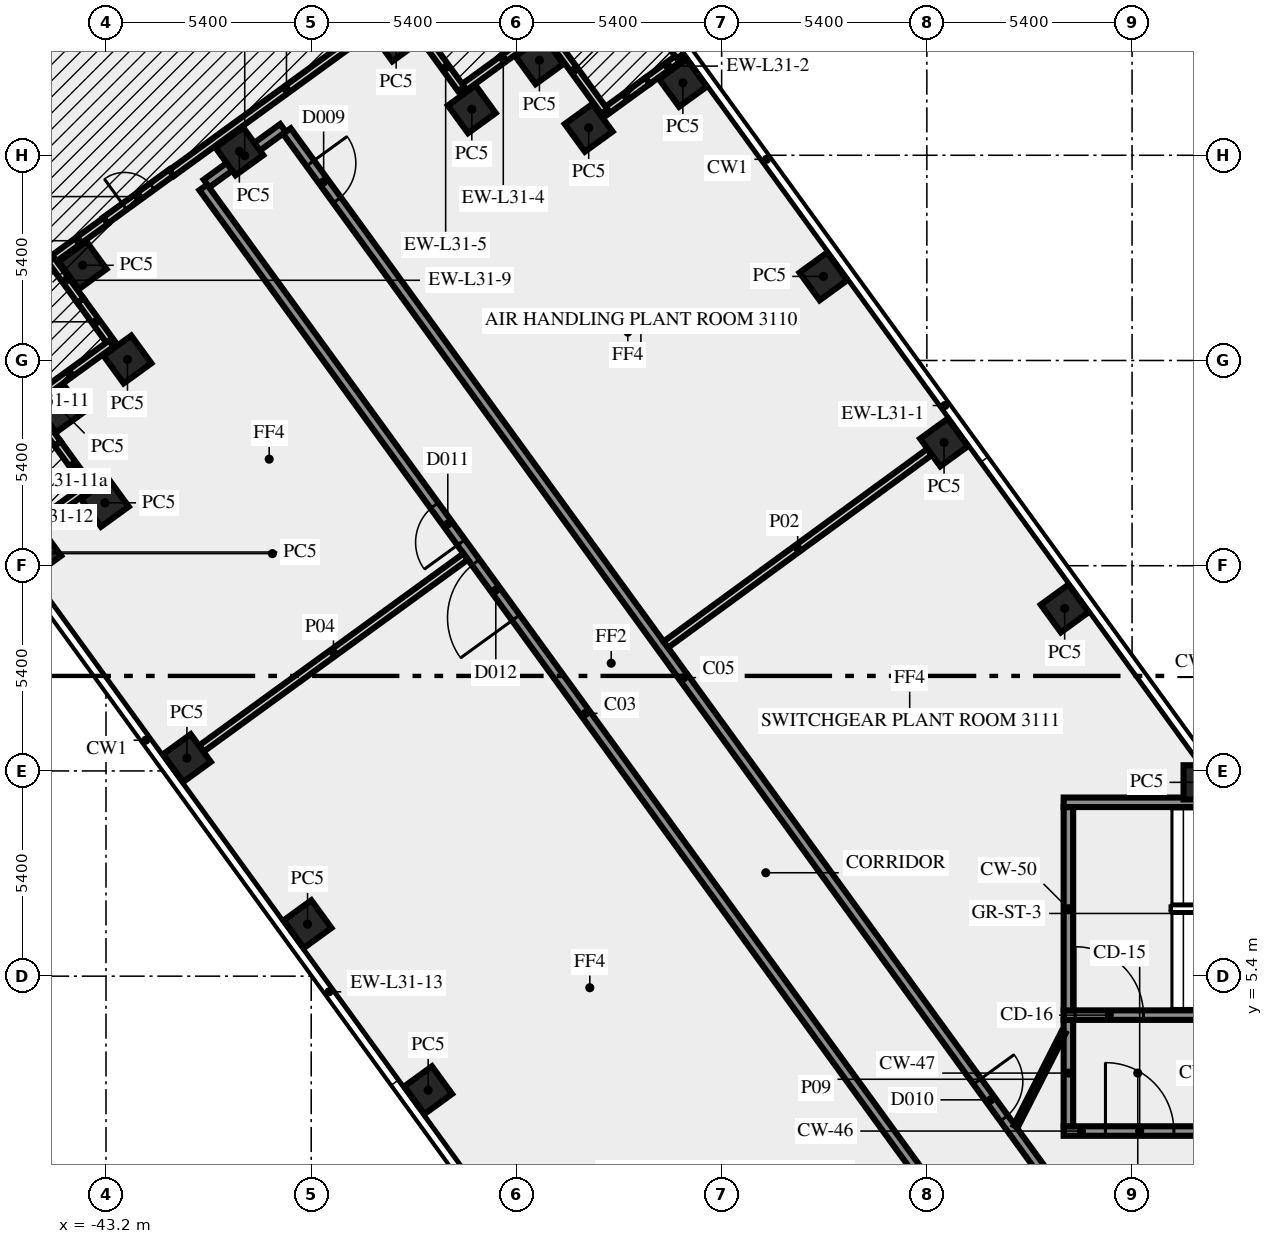
"""IFC4 building model, lengths in metres.
Left out: names, types, materials, properties, quantities, classifications, styles, units other than length and angle.
Written with IfcOpenShell. Run it as: python <this file> out.ifc"""

import sys

from ifc_helpers import new_model, si_unit, direction, frame, frame_2d, origin, origin_2d, place, context, subcontext, project, spatial, rectangle, extrude, element, fill, save


model = new_model("IFC4")
c1 = context("Model", 3, precision=1e-05, world=origin(), true_north=direction((0.0, 1.0)))
c2 = subcontext(c1, "Body", "Model", "MODEL_VIEW")
j1 = project(units=[si_unit("LENGTHUNIT", "METRE"), si_unit("PLANEANGLEUNIT", "RADIAN")], contexts=[c1])
p1 = place(None, origin())
s1 = spatial("IfcSite", under=j1, at=p1, CompositionType="ELEMENT")
p2 = place(p1, origin())
s2 = spatial("IfcBuilding", under=s1, at=p2, CompositionType="ELEMENT")
p3 = place(p2, frame((0.0, 0.0, 133.0)))
s3 = spatial("IfcBuildingStorey", under=s2, at=p3, CompositionType="ELEMENT", Elevation=133.0)
for number, where, z_axis, x_axis in (
    (1, (-17.974, 15.075, 0.0), (0.0, 0.0, 1.0), (-0.588, 0.809, 0.0)),
    (2, (-21.147, 19.444, 0.0), (0.0, 0.0, 1.0), (-0.588, 0.809, 0.0)),
    (3, (-24.321, 23.812, 0.0), (0.0, 0.0, 1.0), (-0.588, 0.809, 0.0)),
    (4, (-28.02, 28.905, 0.0), (0.0, 0.0, 1.0), (-0.809, -0.588, 0.0)),
    (5, (-30.499, 27.723, 0.0), (0.0, 0.0, 1.0), (-0.809, -0.588, 0.0)),
    (6, (-31.795, 29.5, 0.0), (0.0, 0.0, 1.0), (-0.588, 0.809, 0.0)),
    (7, (-33.574, 28.209, 0.0), (0.0, 0.0, 1.0), (-0.588, 0.809, 0.0)),
    (8, (-35.565, 30.1, 0.0), (0.0, 0.0, 1.0), (-0.809, -0.588, 0.0)),
    (9, (-39.691, 27.102, 0.0), (0.0, 0.0, 1.0), (-0.809, -0.588, 0.0)),
    (10, (-43.815, 24.105, 0.0), (0.0, 0.0, 1.0), (-0.809, -0.588, 0.0)),
    (11, (-42.635, 21.626, 0.0), (0.0, 0.0, 1.0), (-0.809, -0.588, 0.0)),
    (12, (-44.415, 20.335, 0.0), (0.0, 0.0, 1.0), (0.588, -0.809, 0.0)),
    (13, (-43.231, 17.854, 0.0), (0.0, 0.0, 1.0), (0.588, -0.809, 0.0)),
    (14, (-45.01, 16.56, 0.0), (0.0, 0.0, 1.0), (0.588, -0.809, 0.0)),
    (15, (-41.07, 11.137, 0.0), (0.0, 0.0, 1.0), (0.588, -0.809, 0.0)),
    (16, (-37.896, 6.769, 0.0), (0.0, 0.0, 1.0), (0.588, -0.809, 0.0)),
    (17, (-34.722, 2.4, 0.0), (0.0, 0.0, 1.0), (0.588, -0.809, 0.0)),
    (18, (-14.395, 10.5, 0.0), (0.0, 0.0, 1.0), (-1.0, 0.0, 0.0)),
):
    element("IfcColumn", number, at=place(p3, frame(where, z_axis=z_axis, x_axis=x_axis)), inside=s3, PredefinedType="COLUMN", context=c2, shape_type="SweptSolid", body=[
        extrude(rectangle(XDim=0.9, YDim=0.9, at=origin_2d()), origin(), (0.0, 0.0, 1.0), 5.6),
    ])
p4 = place(p3, frame((-14.354, 11.093, 0.0), z_axis=(0.0, 0.0, 1.0), x_axis=(-0.587790518608, 0.809013168147, 0.0)))
e19 = element("IfcWall", 19, at=p4, inside=s3, PredefinedType="SOLIDWALL", context=c2, shape_type="SweptSolid", body=[
    extrude(rectangle(XDim=23.044, YDim=0.2, at=frame_2d((11.522, 0.0))), origin(), (0.0, 0.0, 1.0), 5.6),
])
p5 = place(p3, frame((-27.882, 29.733, 0.0), z_axis=(0.0, 0.0, 1.0), x_axis=(-0.809064357795, -0.587720056613, 0.0)))
e20 = element("IfcWall", 20, at=p5, inside=s3, PredefinedType="SOLIDWALL", context=c2, shape_type="SweptSolid", body=[
    extrude(rectangle(XDim=1.318, YDim=0.2, at=frame_2d((0.659, 0.0))), origin(), (0.0, 0.0, 1.0), 5.6),
])
p6 = place(p3, frame((-28.949, 28.959, 0.0), z_axis=(0.0, 0.0, 1.0), x_axis=(-0.809003403559, -0.587803957991, 0.0)))
e21 = element("IfcWall", 21, at=p6, inside=s3, PredefinedType="SOLIDWALL", context=c2, shape_type="SweptSolid", body=[
    extrude(rectangle(XDim=1.382, YDim=0.2, at=frame_2d((0.691, 0.0))), origin(), (0.0, 0.0, 1.0), 4.1),
])
for number, where, z_axis, x_axis in (
    (22, (-30.083, 28.149, 0.0), (0.0, 0.0, 1.0), (-0.588, 0.809, 0.0)),
    (23, (-31.654, 30.331, 0.0), (0.0, 0.0, 1.0), (-0.809, -0.588, 0.0)),
):
    element("IfcWall", number, at=place(p3, frame(where, z_axis=z_axis, x_axis=x_axis)), inside=s3, PredefinedType="SOLIDWALL", context=c2, shape_type="SweptSolid", body=[
        extrude(rectangle(XDim=2.7, YDim=0.2, at=frame_2d((1.35, 0.0))), origin(), (0.0, 0.0, 1.0), 5.6),
    ])
p7 = place(p3, frame((-33.855, 28.746, 0.0), z_axis=(0.0, 0.0, 1.0), x_axis=(-0.587847138415, 0.808972027858, 0.0)))
e24 = element("IfcWall", 24, at=p7, inside=s3, PredefinedType="SOLIDWALL", context=c2, shape_type="SweptSolid", body=[
    extrude(rectangle(XDim=1.387, YDim=0.2, at=frame_2d((0.693, 0.0))), origin(), (0.0, 0.0, 1.0), 4.1),
])
p8 = place(p3, frame((-35.425, 30.928, 0.0), z_axis=(0.0, 0.0, 1.0), x_axis=(-0.809001309088, -0.587806840633, 0.0)))
e25 = element("IfcWall", 25, at=p8, inside=s3, PredefinedType="SOLIDWALL", context=c2, shape_type="SweptSolid", body=[
    extrude(rectangle(XDim=7.481, YDim=0.2, at=frame_2d((3.741, 0.0))), origin(), (0.0, 0.0, 1.0), 5.6),
])
p9 = place(p3, frame((-43.214, 25.284, 0.0), z_axis=(0.0, 0.0, 1.0), x_axis=(0.809022465264, 0.587777722186, 0.0)))
e26 = element("IfcWall", 26, at=p9, inside=s3, PredefinedType="SOLIDWALL", context=c2, shape_type="SweptSolid", body=[
    extrude(rectangle(XDim=2.137, YDim=0.2, at=frame_2d((1.069, 0.0))), origin(), (0.0, 0.0, 1.0), 5.6),
])
p10 = place(p9, frame((0.619, 0.0, 0.0)))
e27 = element("IfcOpeningElement", 27, at=p10, cuts=e26, PredefinedType="OPENING", context=c2, shape_type="SweptSolid", body=[
    extrude(rectangle(XDim=0.9, YDim=2.1, at=frame_2d((0.45, 1.05))), frame((0.0, 0.11, 0.0), z_axis=(0.0, -1.0, 0.0), x_axis=(1.0, 0.0, 0.0)), (0.0, 0.0, 1.0), 0.22),
])
p11 = place(p3, frame((-43.207, 25.274, 0.0), z_axis=(0.0, 0.0, 1.0), x_axis=(-0.808955331464, -0.587870114648, 0.0)))
e28 = element("IfcWall", 28, at=p11, inside=s3, PredefinedType="SOLIDWALL", context=c2, shape_type="SweptSolid", body=[
    extrude(rectangle(XDim=1.781, YDim=0.2, at=frame_2d((0.891, 0.0))), origin(), (0.0, 0.0, 1.0), 5.6),
])
p12 = place(p3, frame((-44.645, 24.244, 0.0), z_axis=(0.0, 0.0, 1.0), x_axis=(0.587797718958, -0.809007936665, 0.0)))
e29 = element("IfcWall", 29, at=p12, inside=s3, PredefinedType="SOLIDWALL", context=c2, shape_type="SweptSolid", body=[
    extrude(rectangle(XDim=1.32, YDim=0.2, at=frame_2d((0.66, 0.0))), origin(), (0.0, 0.0, 1.0), 5.6),
])
p13 = place(p3, frame((-43.869, 23.176, 0.0), z_axis=(0.0, 0.0, 1.0), x_axis=(0.587845576324, -0.808973162964, 0.0)))
e30 = element("IfcWall", 30, at=p13, inside=s3, PredefinedType="SOLIDWALL", context=c2, shape_type="SweptSolid", body=[
    extrude(rectangle(XDim=1.38, YDim=0.2, at=frame_2d((0.69, 0.0))), origin(), (0.0, 0.0, 1.0), 4.1),
])
p14 = place(p3, frame((-43.061, 22.043, 0.0), z_axis=(0.0, 0.0, 1.0), x_axis=(-0.809033161865, -0.587762999008, 0.0)))
e31 = element("IfcWall", 31, at=p14, inside=s3, PredefinedType="SOLIDWALL", context=c2, shape_type="SweptSolid", body=[
    extrude(rectangle(XDim=2.7, YDim=0.2, at=frame_2d((1.35, 0.0))), origin(), (0.0, 0.0, 1.0), 5.6),
])
p15 = place(p3, frame((-45.242, 20.473, 0.0), z_axis=(0.0, 0.0, 1.0), x_axis=(0.587652369972, -0.809113522361, 0.0)))
e32 = element("IfcWall", 32, at=p15, inside=s3, PredefinedType="SOLIDWALL", context=c2, shape_type="SweptSolid", body=[
    extrude(rectangle(XDim=1.314, YDim=0.2, at=frame_2d((0.657, 0.0))), origin(), (0.0, 0.0, 1.0), 5.6),
])
p16 = place(p3, frame((-44.47, 19.41, 0.0), z_axis=(0.0, 0.0, 1.0), x_axis=(0.58786788786, -0.808956949672, 0.0)))
e33 = element("IfcWall", 33, at=p16, inside=s3, PredefinedType="SOLIDWALL", context=c2, shape_type="SweptSolid", body=[
    extrude(rectangle(XDim=1.386, YDim=0.2, at=frame_2d((0.693, 0.0))), origin(), (0.0, 0.0, 1.0), 4.1),
])
p17 = place(p3, frame((-43.658, 18.272, 0.0), z_axis=(0.0, 0.0, 1.0), x_axis=(-0.808958916286, -0.58786518162, 0.0)))
e34 = element("IfcWall", 34, at=p17, inside=s3, PredefinedType="SOLIDWALL", context=c2, shape_type="SweptSolid", body=[
    extrude(rectangle(XDim=2.7, YDim=0.2, at=frame_2d((1.35, 0.0))), origin(), (0.0, 0.0, 1.0), 5.6),
])
p18 = place(p3, frame((-45.84, 16.701, 0.0), z_axis=(0.0, 0.0, 1.0), x_axis=(0.587788110303, -0.809014917901, 0.0)))
e35 = element("IfcWall", 35, at=p18, inside=s3, PredefinedType="SOLIDWALL", context=c2, shape_type="SweptSolid", body=[
    extrude(rectangle(XDim=28.956, YDim=0.2, at=frame_2d((14.478, 0.0))), origin(), (0.0, 0.0, 1.0), 5.6),
])
p19 = place(p3, frame((-37.344, 42.373, 0.0), z_axis=(0.0, 0.0, 1.0), x_axis=(0.587788703145, -0.809014487172, 0.0)))
e36 = element("IfcWall", 36, at=p19, inside=s3, PredefinedType="PARAPET", context=c2, shape_type="SweptSolid", body=[
    extrude(rectangle(XDim=15.77, YDim=0.25, at=frame_2d((7.885, 0.0))), origin(), (0.0, 0.0, 1.0), 1.1),
])
p20 = place(p3, frame((-18.0, 1.325, 0.0), z_axis=(0.0, 0.0, 1.0), x_axis=(1.0, 0.0, 0.0)))
e37 = element("IfcWall", 37, at=p20, inside=s3, PredefinedType="SHEAR", context=c2, shape_type="SweptSolid", body=[
    extrude(rectangle(XDim=3.9, YDim=0.25, at=frame_2d((1.95, 0.0))), origin(), (0.0, 0.0, 1.0), 5.6),
])
p21 = place(p20, frame((1.1, 0.0, 0.0)))
e38 = element("IfcOpeningElement", 38, at=p21, cuts=e37, PredefinedType="OPENING", context=c2, shape_type="SweptSolid", body=[
    extrude(rectangle(XDim=1.8, YDim=2.1, at=frame_2d((0.9, 1.05))), frame((0.0, 0.135, 0.0), z_axis=(0.0, -1.0, 0.0), x_axis=(1.0, 0.0, 0.0)), (0.0, 0.0, 1.0), 0.27),
])
p22 = place(p3, frame((-17.875, 1.45, 0.0), z_axis=(0.0, 0.0, 1.0), x_axis=(0.0, 1.0, 0.0)))
e39 = element("IfcWall", 39, at=p22, inside=s3, PredefinedType="SHEAR", context=c2, shape_type="SweptSolid", body=[
    extrude(rectangle(XDim=2.8, YDim=0.25, at=frame_2d((1.4, 0.0))), origin(), (0.0, 0.0, 1.0), 5.6),
])
p23 = place(p3, frame((-18.0, 4.375, 0.0), z_axis=(0.0, 0.0, 1.0), x_axis=(1.0, 0.0, 0.0)))
e40 = element("IfcWall", 40, at=p23, inside=s3, PredefinedType="SHEAR", context=c2, shape_type="SweptSolid", body=[
    extrude(rectangle(XDim=10.5, YDim=0.25, at=frame_2d((5.25, 0.0))), origin(), (0.0, 0.0, 1.0), 5.6),
])
p24 = place(p23, frame((0.3, 0.0, 0.0)))
e41 = element("IfcOpeningElement", 41, at=p24, cuts=e40, PredefinedType="OPENING", context=c2, shape_type="SweptSolid", body=[
    extrude(rectangle(XDim=1.8, YDim=2.1, at=frame_2d((0.9, 1.05))), frame((0.0, 0.135, 0.0), z_axis=(0.0, -1.0, 0.0), x_axis=(1.0, 0.0, 0.0)), (0.0, 0.0, 1.0), 0.27),
])
p25 = place(p3, frame((-17.875, 4.5, 0.0), z_axis=(0.0, 0.0, 1.0), x_axis=(0.0, 1.0, 0.0)))
e42 = element("IfcWall", 42, at=p25, inside=s3, PredefinedType="SHEAR", context=c2, shape_type="SweptSolid", body=[
    extrude(rectangle(XDim=5.35, YDim=0.25, at=frame_2d((2.675, 0.0))), origin(), (0.0, 0.0, 1.0), 5.6),
])
p26 = place(p3, frame((-18.0, 9.975, 0.0), z_axis=(0.0, 0.0, 1.0), x_axis=(1.0, 0.0, 0.0)))
e43 = element("IfcWall", 43, at=p26, inside=s3, PredefinedType="SHEAR", context=c2, shape_type="SweptSolid", body=[
    extrude(rectangle(XDim=10.5, YDim=0.25, at=frame_2d((5.25, 0.0))), origin(), (0.0, 0.0, 1.0), 5.6),
])
p27 = place(p26, frame((4.5, 0.0, 1.0)))
e44 = element("IfcOpeningElement", 44, at=p27, cuts=e43, PredefinedType="OPENING", context=c2, shape_type="SweptSolid", body=[
    extrude(rectangle(XDim=1.2, YDim=1.2, at=frame_2d((0.6, 0.6))), frame((0.0, 0.135, 0.0), z_axis=(0.0, -1.0, 0.0), x_axis=(1.0, 0.0, 0.0)), (0.0, 0.0, 1.0), 0.27),
])
p28 = place(p3, frame((-20.531, -1.523, 0.0), z_axis=(0.0, 0.0, 1.0), x_axis=(-0.587786778139, 0.80901588578, 0.0)))
e45 = element("IfcWall", 45, at=p28, inside=s3, PredefinedType="SOLIDWALL", context=c2, shape_type="SweptSolid", body=[
    extrude(rectangle(XDim=34.212, YDim=0.25, at=frame_2d((17.106, 0.0))), origin(), (0.0, 0.0, 1.0), 5.6),
])
p29 = place(p28, frame((20.216, 0.0, 0.0)))
e46 = element("IfcOpeningElement", 46, at=p29, cuts=e45, PredefinedType="OPENING", context=c2, shape_type="SweptSolid", body=[
    extrude(rectangle(XDim=1.8, YDim=2.1, at=frame_2d((0.9, 1.05))), frame((0.0, 0.135, 0.0), z_axis=(0.0, -1.0, 0.0), x_axis=(1.0, 0.0, 0.0)), (0.0, 0.0, 1.0), 0.27),
])
p30 = place(p28, frame((0.483, 0.0, 0.0)))
e47 = element("IfcOpeningElement", 47, at=p30, cuts=e45, PredefinedType="OPENING", context=c2, shape_type="SweptSolid", body=[
    extrude(rectangle(XDim=1.8, YDim=2.1, at=frame_2d((0.9, 1.05))), frame((0.0, 0.135, 0.0), z_axis=(0.0, -1.0, 0.0), x_axis=(1.0, 0.0, 0.0)), (0.0, 0.0, 1.0), 0.27),
])
p31 = place(p28, frame((22.665, 0.0, 0.0)))
e48 = element("IfcOpeningElement", 48, at=p31, cuts=e45, PredefinedType="OPENING", context=c2, shape_type="SweptSolid", body=[
    extrude(rectangle(XDim=1.2, YDim=2.1, at=frame_2d((0.6, 1.05))), frame((0.0, 0.135, 0.0), z_axis=(0.0, -1.0, 0.0), x_axis=(1.0, 0.0, 0.0)), (0.0, 0.0, 1.0), 0.27),
])
p32 = place(p3, frame((-40.556, 26.257, 0.0), z_axis=(0.0, 0.0, 1.0), x_axis=(0.809045768422, 0.587745646176, 0.0)))
e49 = element("IfcWall", 49, at=p32, inside=s3, PredefinedType="SOLIDWALL", context=c2, shape_type="SweptSolid", body=[
    extrude(rectangle(XDim=2.488, YDim=0.25, at=frame_2d((1.244, 0.0))), origin(), (0.0, 0.0, 1.0), 5.6),
])
p33 = place(p3, frame((-38.44, 27.635, 0.0), z_axis=(0.0, 0.0, 1.0), x_axis=(0.587787785895, -0.809015153599, 0.0)))
e50 = element("IfcWall", 50, at=p33, inside=s3, PredefinedType="SOLIDWALL", context=c2, shape_type="SweptSolid", body=[
    extrude(rectangle(XDim=35.549, YDim=0.25, at=frame_2d((17.775, 0.0))), origin(), (0.0, 0.0, 1.0), 5.6),
])
p34 = place(p33, frame((1.046, 0.0, 0.0)))
e51 = element("IfcOpeningElement", 51, at=p34, cuts=e50, PredefinedType="OPENING", context=c2, shape_type="SweptSolid", body=[
    extrude(rectangle(XDim=1.2, YDim=2.1, at=frame_2d((0.6, 1.05))), frame((0.0, 0.135, 0.0), z_axis=(0.0, -1.0, 0.0), x_axis=(1.0, 0.0, 0.0)), (0.0, 0.0, 1.0), 0.27),
])
p35 = place(p33, frame((30.907, 0.0, 0.0)))
e52 = element("IfcOpeningElement", 52, at=p35, cuts=e50, PredefinedType="OPENING", context=c2, shape_type="SweptSolid", body=[
    extrude(rectangle(XDim=1.2, YDim=2.1, at=frame_2d((0.6, 1.05))), frame((0.0, 0.135, 0.0), z_axis=(0.0, -1.0, 0.0), x_axis=(1.0, 0.0, 0.0)), (0.0, 0.0, 1.0), 0.27),
])
p36 = place(p3, frame((-28.469, 14.124, 0.0), z_axis=(0.0, 0.0, 1.0), x_axis=(0.807513406154, 0.589849217074, 0.0)))
e53 = element("IfcWall", 53, at=p36, inside=s3, PredefinedType="SOLIDWALL", context=c2, shape_type="SweptSolid", body=[
    extrude(rectangle(XDim=8.595, YDim=0.2, at=frame_2d((4.298, 0.0))), origin(), (0.0, 0.0, 1.0), 5.6),
])
p37 = place(p3, frame((-33.737, 16.441, 0.0), z_axis=(0.0, 0.0, 1.0), x_axis=(-0.80896572488, -0.587855812227, 0.0)))
e54 = element("IfcWall", 54, at=p37, inside=s3, PredefinedType="SOLIDWALL", context=c2, shape_type="SweptSolid", body=[
    extrude(rectangle(XDim=8.595, YDim=0.2, at=frame_2d((4.297, 0.0))), origin(), (0.0, 0.0, 1.0), 5.6),
])
p38 = place(p3, frame((-19.261, 1.45, 0.0), z_axis=(0.0, 0.0, 1.0), x_axis=(0.453950796792, 0.891026752736, 0.0)))
e55 = element("IfcWall", 55, at=p38, inside=s3, PredefinedType="PARTITIONING", context=c2, shape_type="SweptSolid", body=[
    extrude(rectangle(XDim=2.778, YDim=0.12, at=frame_2d((1.389, 0.0))), origin(), (0.0, 0.0, 1.0), 5.6),
])
p39 = place(p10, origin())
e56 = element("IfcDoor", 56, at=p39, inside=s3, OperationType="SINGLE_SWING_RIGHT", PredefinedType="DOOR", context=c2, shape_type="SweptSolid", body=[
    extrude(rectangle(XDim=0.9, YDim=2.1, at=frame_2d((0.45, 1.05))), frame((0.0, 0.025, 0.0), z_axis=(0.0, -1.0, 0.0), x_axis=(1.0, 0.0, 0.0)), (0.0, 0.0, 1.0), 0.05),
])
fill(e27, e56)
p40 = place(p21, origin())
e57 = element("IfcDoor", 57, at=p40, inside=s3, OperationType="DOUBLE_DOOR_SINGLE_SWING", PredefinedType="DOOR", context=c2, shape_type="SweptSolid", body=[
    extrude(rectangle(XDim=1.8, YDim=2.1, at=frame_2d((0.9, 1.05))), frame((0.0, 0.025, 0.0), z_axis=(0.0, -1.0, 0.0), x_axis=(1.0, 0.0, 0.0)), (0.0, 0.0, 1.0), 0.05),
])
fill(e38, e57)
p41 = place(p24, origin())
e58 = element("IfcDoor", 58, at=p41, inside=s3, OperationType="DOUBLE_DOOR_SINGLE_SWING", PredefinedType="DOOR", context=c2, shape_type="SweptSolid", body=[
    extrude(rectangle(XDim=1.8, YDim=2.1, at=frame_2d((0.9, 1.05))), frame((0.0, 0.025, 0.0), z_axis=(0.0, -1.0, 0.0), x_axis=(1.0, 0.0, 0.0)), (0.0, 0.0, 1.0), 0.05),
])
fill(e41, e58)
p42 = place(p34, origin())
e59 = element("IfcDoor", 59, at=p42, inside=s3, OperationType="SINGLE_SWING_LEFT", PredefinedType="DOOR", context=c2, shape_type="SweptSolid", body=[
    extrude(rectangle(XDim=1.2, YDim=2.1, at=frame_2d((0.6, 1.05))), frame((0.0, 0.025, 0.0), z_axis=(0.0, -1.0, 0.0), x_axis=(1.0, 0.0, 0.0)), (0.0, 0.0, 1.0), 0.05),
])
fill(e51, e59)
p43 = place(p29, origin())
e60 = element("IfcDoor", 60, at=p43, inside=s3, OperationType="DOUBLE_DOOR_SINGLE_SWING", PredefinedType="DOOR", context=c2, shape_type="SweptSolid", body=[
    extrude(rectangle(XDim=1.8, YDim=2.1, at=frame_2d((0.9, 1.05))), frame((0.0, 0.025, 0.0), z_axis=(0.0, -1.0, 0.0), x_axis=(1.0, 0.0, 0.0)), (0.0, 0.0, 1.0), 0.05),
])
fill(e46, e60)
p44 = place(p35, origin())
e61 = element("IfcDoor", 61, at=p44, inside=s3, OperationType="SINGLE_SWING_RIGHT", PredefinedType="DOOR", context=c2, shape_type="SweptSolid", body=[
    extrude(rectangle(XDim=1.2, YDim=2.1, at=frame_2d((0.6, 1.05))), frame((0.0, 0.025, 0.0), z_axis=(0.0, -1.0, 0.0), x_axis=(1.0, 0.0, 0.0)), (0.0, 0.0, 1.0), 0.05),
])
fill(e52, e61)
p45 = place(p31, origin())
e62 = element("IfcDoor", 62, at=p45, inside=s3, OperationType="SINGLE_SWING_LEFT", PredefinedType="DOOR", context=c2, shape_type="SweptSolid", body=[
    extrude(rectangle(XDim=1.2, YDim=2.1, at=frame_2d((0.6, 1.05))), frame((0.0, 0.025, 0.0), z_axis=(0.0, -1.0, 0.0), x_axis=(1.0, 0.0, 0.0)), (0.0, 0.0, 1.0), 0.05),
])
fill(e48, e62)
save(model, sys.argv[1])
